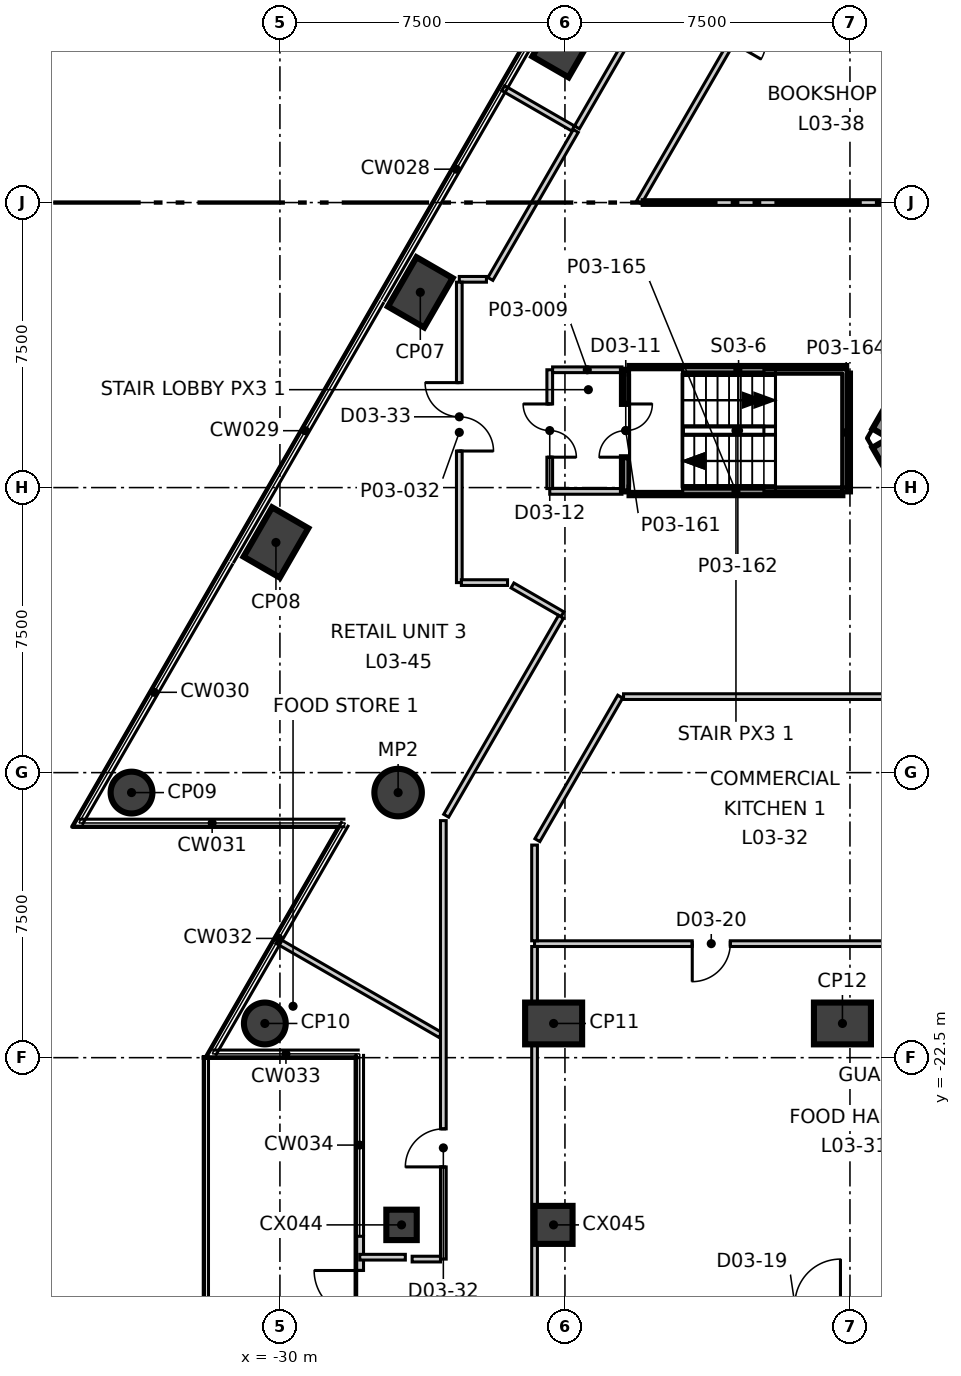
"""IFC4 building model, lengths in metres.
Left out: names, types, materials, properties, quantities, classifications, styles, units other than length and angle.
Written with IfcOpenShell. Run it as: python <this file> out.ifc"""

import sys

from ifc_helpers import new_model, si_unit, direction, frame, frame_2d, origin, origin_2d, place, context, subcontext, project, spatial, polyline, rectangle, circle, outline, extrude, element, fill, save


model = new_model("IFC4")
c1 = context("Model", 3, precision=1e-05, world=origin(), true_north=direction((0.0, 1.0)))
c2 = subcontext(c1, "Body", "Model", "MODEL_VIEW")
j1 = project(units=[si_unit("LENGTHUNIT", "METRE"), si_unit("PLANEANGLEUNIT", "RADIAN")], contexts=[c1])
p1 = place(None, origin())
s1 = spatial("IfcSite", under=j1, at=p1, CompositionType="ELEMENT")
p2 = place(p1, origin())
s2 = spatial("IfcBuilding", under=s1, at=p2, CompositionType="ELEMENT")
p3 = place(p2, frame((0.0, 0.0, 19.9)))
s3 = spatial("IfcBuildingStorey", under=s2, at=p3, CompositionType="ELEMENT", Elevation=19.9)
p4 = place(p3, frame((-1.617, 15.2, -0.4), z_axis=(0.0, 0.0, 1.0), x_axis=(-0.499992141631, -0.866029940768, 0.0)))
e1 = element("IfcWall", 1, at=p4, inside=s3, PredefinedType="SHEAR", context=c2, shape_type="SweptSolid", body=[
    extrude(outline(polyline([(-0.289, -0.499), (1.656, -0.499), (3.601, -0.499), (5.547, -0.499), (7.492, -0.499), (9.437, -0.5), (11.382, -0.5), (13.328, -0.5), (15.273, -0.5), (17.218, -0.5), (19.163, -0.5), (21.109, -0.5), (23.054, -0.5), (24.999, -0.5), (24.422, 0.5), (22.566, 0.5), (20.709, 0.5), (18.853, 0.5), (16.997, 0.5), (15.14, 0.5), (13.284, 0.5), (11.427, 0.5), (9.571, 0.5), (7.715, 0.5), (5.858, 0.5), (4.002, 0.5), (2.146, 0.5), (0.289, 0.5), (-0.289, -0.499)])), origin(), (0.0, 0.0, 1.0), 5.4),
])
p5 = place(p4, frame((11.805, 0.0, 0.4)))
e2 = element("IfcOpeningElement", 2, at=p5, cuts=e1, PredefinedType="OPENING", context=c2, shape_type="SweptSolid", body=[
    extrude(rectangle(XDim=1.1, YDim=2.1, at=frame_2d((0.55, 1.05))), frame((0.0, 0.51, 0.0), z_axis=(0.0, -1.0, 0.0), x_axis=(1.0, 0.0, 0.0)), (0.0, 0.0, 1.0), 1.02),
])
p6 = place(p3, frame((-13.972, -6.2, -0.4), z_axis=(0.0, 0.0, 1.0), x_axis=(0.500077567175, -0.865980615723, 0.0)))
e3 = element("IfcWall", 3, at=p6, inside=s3, PredefinedType="SHEAR", context=c2, shape_type="SweptSolid", body=[
    extrude(outline(polyline([(-0.289, -0.5), (1.616, -0.5), (3.522, -0.5), (2.944, 0.499), (1.617, 0.5), (0.289, 0.5), (-0.289, -0.5)])), origin(), (0.0, 0.0, 1.0), 5.4),
])
p7 = place(p6, frame((0.917, 0.0, 0.4)))
e4 = element("IfcOpeningElement", 4, at=p7, cuts=e3, PredefinedType="OPENING", context=c2, shape_type="SweptSolid", body=[
    extrude(rectangle(XDim=1.4, YDim=2.1, at=frame_2d((0.7, 1.05))), frame((0.0, 0.51, 0.0), z_axis=(0.0, -1.0, 0.0), x_axis=(1.0, 0.0, 0.0)), (0.0, 0.0, 1.0), 1.02),
])
for number, where, z_axis, x_axis in (
    (5, (-22.506, 4.219, -0.4), (0.0, 0.0, 1.0), (0.5, 0.866, 0.0)),
    (6, (-26.306, -2.362, -0.4), (0.0, 0.0, 1.0), (0.5, 0.866, 0.0)),
    (7, (-30.105, -8.944, -0.4), (0.0, 0.0, 1.0), (0.5, 0.866, 0.0)),
):
    element("IfcColumn", number, at=place(p3, frame(where, z_axis=z_axis, x_axis=x_axis)), inside=s3, PredefinedType="COLUMN", context=c2, shape_type="SweptSolid", body=[
        extrude(rectangle(XDim=1.5, YDim=1.1, at=origin_2d()), origin(), (0.0, 0.0, 1.0), 5.4),
    ])
for number, where, z_axis, x_axis in (
    (8, (-33.905, -15.525, -0.4), (0.0, 0.0, 1.0), (0.5, 0.866, 0.0)),
    (9, (-30.397, -21.6, -0.4), (0.0, 0.0, 1.0), (1.0, 0.0, 0.0)),
):
    element("IfcColumn", number, at=place(p3, frame(where, z_axis=z_axis, x_axis=x_axis)), inside=s3, PredefinedType="COLUMN", context=c2, shape_type="SweptSolid", body=[
        extrude(circle(Radius=0.55, at=origin_2d()), origin(), (0.0, 0.0, 1.0), 5.4),
    ])
for number, where, z_axis, x_axis in (
    (10, (-22.798, -21.6, -0.4), (0.0, 0.0, 1.0), (1.0, 0.0, 0.0)),
    (11, (-15.198, -21.6, -0.4), (0.0, 0.0, 1.0), (1.0, 0.0, 0.0)),
):
    element("IfcColumn", number, at=place(p3, frame(where, z_axis=z_axis, x_axis=x_axis)), inside=s3, PredefinedType="COLUMN", context=c2, shape_type="SweptSolid", body=[
        extrude(rectangle(XDim=1.5, YDim=1.1, at=origin_2d()), origin(), (0.0, 0.0, 1.0), 5.4),
    ])
p8 = place(p3, frame((-26.89, -15.525, -0.4), z_axis=(0.0, 0.0, 1.0), x_axis=(1.0, 0.0, 0.0)))
e12 = element("IfcColumn", 12, at=p8, inside=s3, PredefinedType="COLUMN", context=c2, shape_type="SweptSolid", body=[
    extrude(circle(Radius=0.625, at=origin_2d()), origin(), (0.0, 0.0, 1.0), 5.4),
])
p9 = place(p3, frame((-26.8, -26.9, -0.4), z_axis=(0.0, 0.0, 1.0), x_axis=(1.0, 0.0, 0.0)))
e13 = element("IfcColumn", 13, at=p9, inside=s3, PredefinedType="COLUMN", context=c2, shape_type="SweptSolid", body=[
    extrude(rectangle(XDim=0.8, YDim=0.8, at=origin_2d()), origin(), (0.0, 0.0, 1.0), 5.4),
])
p10 = place(p3, frame((-22.8, -26.9, -0.4), z_axis=(0.0, 0.0, 1.0), x_axis=(1.0, 0.0, 0.0)))
e14 = element("IfcColumn", 14, at=p10, inside=s3, PredefinedType="COLUMN", context=c2, shape_type="SweptSolid", body=[
    extrude(rectangle(XDim=1.0, YDim=1.0, at=origin_2d()), origin(), (0.0, 0.0, 1.0), 5.4),
])
p11 = place(p3, frame((-27.9, -27.2, 0.0), z_axis=(0.0, 0.0, 1.0), x_axis=(0.0, -1.0, 0.0)))
e15 = element("IfcWall", 15, at=p11, inside=s3, PredefinedType="ELEMENTEDWALL", context=c2, shape_type="SweptSolid", body=[
    extrude(rectangle(XDim=4.2, YDim=0.2, at=frame_2d((2.1, 0.0))), origin(), (0.0, 0.0, 1.0), 5.0),
])
p12 = place(p11, frame((0.9, 0.0, 0.0)))
e16 = element("IfcOpeningElement", 16, at=p12, cuts=e15, PredefinedType="OPENING", context=c2, shape_type="SweptSolid", body=[
    extrude(rectangle(XDim=2.4, YDim=2.4, at=frame_2d((1.2, 1.2))), frame((0.0, 0.11, 0.0), z_axis=(0.0, -1.0, 0.0), x_axis=(1.0, 0.0, 0.0)), (0.0, 0.0, 1.0), 0.22),
])
p13 = place(p3, frame((-23.3, -19.5, 0.0), z_axis=(0.0, 0.0, 1.0), x_axis=(1.0, 0.0, 0.0)))
e17 = element("IfcWall", 17, at=p13, inside=s3, PredefinedType="PARTITIONING", context=c2, shape_type="SweptSolid", body=[
    extrude(rectangle(XDim=9.3, YDim=0.15, at=frame_2d((4.65, 0.0))), origin(), (0.0, 0.0, 1.0), 5.0),
])
p14 = place(p13, frame((4.15, 0.0, 0.0)))
e18 = element("IfcOpeningElement", 18, at=p14, cuts=e17, PredefinedType="OPENING", context=c2, shape_type="SweptSolid", body=[
    extrude(rectangle(XDim=1.0, YDim=2.1, at=frame_2d((0.5, 1.05))), frame((0.0, 0.085, 0.0), z_axis=(0.0, -1.0, 0.0), x_axis=(1.0, 0.0, 0.0)), (0.0, 0.0, 1.0), 0.17),
])
p15 = place(p3, frame((-23.3, -19.425, 0.0), z_axis=(0.0, 0.0, 1.0), x_axis=(0.0, 1.0, 0.0)))
e19 = element("IfcWall", 19, at=p15, inside=s3, PredefinedType="PARTITIONING", context=c2, shape_type="SweptSolid", body=[
    extrude(rectangle(XDim=2.519, YDim=0.15, at=frame_2d((1.26, 0.0))), origin(), (0.0, 0.0, 1.0), 5.0),
])
p16 = place(p3, frame((-23.225, -16.777, 0.0), z_axis=(0.0, 0.0, 1.0), x_axis=(0.499908216116, 0.86607838875, 0.0)))
e20 = element("IfcWall", 20, at=p16, inside=s3, PredefinedType="PARTITIONING", context=c2, shape_type="SweptSolid", body=[
    extrude(rectangle(XDim=4.361, YDim=0.15, at=frame_2d((2.181, 0.0))), origin(), (0.0, 0.0, 1.0), 5.0),
])
p17 = place(p3, frame((-20.958, -13.0, 0.0), z_axis=(0.0, 0.0, 1.0), x_axis=(1.0, 0.0, 0.0)))
e21 = element("IfcWall", 21, at=p17, inside=s3, PredefinedType="PARTITIONING", context=c2, shape_type="SweptSolid", body=[
    extrude(rectangle(XDim=6.958, YDim=0.15, at=frame_2d((3.479, 0.0))), origin(), (0.0, 0.0, 1.0), 5.0),
])
p18 = place(p3, frame((-22.9, -7.6, 0.0), z_axis=(0.0, 0.0, 1.0), x_axis=(1.0, 0.0, 0.0)))
e22 = element("IfcWall", 22, at=p18, inside=s3, PredefinedType="PARTITIONING", context=c2, shape_type="SweptSolid", body=[
    extrude(rectangle(XDim=1.9, YDim=0.15, at=frame_2d((0.95, 0.0))), origin(), (0.0, 0.0, 1.0), 5.0),
])
p19 = place(p3, frame((-22.9, -7.525, 0.0), z_axis=(0.0, 0.0, 1.0), x_axis=(0.0, 1.0, 0.0)))
e23 = element("IfcWall", 23, at=p19, inside=s3, PredefinedType="PARTITIONING", context=c2, shape_type="SweptSolid", body=[
    extrude(rectangle(XDim=3.125, YDim=0.15, at=frame_2d((1.562, 0.0))), origin(), (0.0, 0.0, 1.0), 5.0),
])
p20 = place(p19, frame((0.825, 0.0, 0.0)))
e24 = element("IfcOpeningElement", 24, at=p20, cuts=e23, PredefinedType="OPENING", context=c2, shape_type="SweptSolid", body=[
    extrude(rectangle(XDim=1.4, YDim=2.1, at=frame_2d((0.7, 1.05))), frame((0.0, 0.085, 0.0), z_axis=(0.0, -1.0, 0.0), x_axis=(1.0, 0.0, 0.0)), (0.0, 0.0, 1.0), 0.17),
])
p21 = place(p3, frame((-22.825, -4.4, 0.0), z_axis=(0.0, 0.0, 1.0), x_axis=(1.0, 0.0, 0.0)))
e25 = element("IfcWall", 25, at=p21, inside=s3, PredefinedType="PARTITIONING", context=c2, shape_type="SweptSolid", body=[
    extrude(rectangle(XDim=1.825, YDim=0.15, at=frame_2d((0.913, 0.0))), origin(), (0.0, 0.0, 1.0), 5.0),
])
p22 = place(p3, frame((-30.066, -19.427, 0.0), z_axis=(0.0, 0.0, 1.0), x_axis=(0.866057584811, -0.499944256685, 0.0)))
e26 = element("IfcWall", 26, at=p22, inside=s3, PredefinedType="PARTITIONING", context=c2, shape_type="SweptSolid", body=[
    extrude(rectangle(XDim=4.955, YDim=0.15, at=frame_2d((2.477, 0.0))), origin(), (0.0, 0.0, 1.0), 5.0),
])
p23 = place(p3, frame((-25.7, -27.8, 0.0), z_axis=(0.0, 0.0, 1.0), x_axis=(0.0, 1.0, 0.0)))
e27 = element("IfcWall", 27, at=p23, inside=s3, PredefinedType="PARTITIONING", context=c2, shape_type="SweptSolid", body=[
    extrude(rectangle(XDim=11.537, YDim=0.15, at=frame_2d((5.769, 0.0))), origin(), (0.0, 0.0, 1.0), 5.0),
])
p24 = place(p23, frame((2.426, 0.0, 0.0)))
e28 = element("IfcOpeningElement", 28, at=p24, cuts=e27, PredefinedType="OPENING", context=c2, shape_type="SweptSolid", body=[
    extrude(rectangle(XDim=1.0, YDim=2.1, at=frame_2d((0.5, 1.05))), frame((0.0, 0.085, 0.0), z_axis=(0.0, -1.0, 0.0), x_axis=(1.0, 0.0, 0.0)), (0.0, 0.0, 1.0), 0.17),
])
p25 = place(p3, frame((-26.521, -27.8, 0.0), z_axis=(0.0, 0.0, 1.0), x_axis=(1.0, 0.0, 0.0)))
e29 = element("IfcWall", 29, at=p25, inside=s3, PredefinedType="PARTITIONING", context=c2, shape_type="SweptSolid", body=[
    extrude(rectangle(XDim=0.746, YDim=0.15, at=frame_2d((0.373, 0.0))), origin(), (0.0, 0.0, 1.0), 5.0),
])
p26 = place(p3, frame((-27.9, -27.75, 0.0), z_axis=(0.0, 0.0, 1.0), x_axis=(1.0, 0.0, 0.0)))
e30 = element("IfcWall", 30, at=p26, inside=s3, PredefinedType="PARTITIONING", context=c2, shape_type="SweptSolid", body=[
    extrude(rectangle(XDim=1.2, YDim=0.15, at=frame_2d((0.6, 0.0))), origin(), (0.0, 0.0, 1.0), 5.0),
])
p27 = place(p3, frame((-24.462, -2.01, 0.0), z_axis=(0.0, 0.0, 1.0), x_axis=(0.499835244236, 0.866120504675, 0.0)))
e31 = element("IfcWall", 31, at=p27, inside=s3, PredefinedType="PARTITIONING", context=c2, shape_type="SweptSolid", body=[
    extrude(rectangle(XDim=4.497, YDim=0.15, at=frame_2d((2.249, 0.0))), origin(), (0.0, 0.0, 1.0), 5.0),
])
p28 = place(p3, frame((-25.28, -2.02, 0.0), z_axis=(0.0, 0.0, 1.0), x_axis=(1.0, 0.0, 0.0)))
e32 = element("IfcWall", 32, at=p28, inside=s3, PredefinedType="PARTITIONING", context=c2, shape_type="SweptSolid", body=[
    extrude(rectangle(XDim=0.714, YDim=0.15, at=frame_2d((0.357, 0.0))), origin(), (0.0, 0.0, 1.0), 4.4),
])
p29 = place(p3, frame((-25.28, -10.0, 0.0), z_axis=(0.0, 0.0, 1.0), x_axis=(0.0, 1.0, 0.0)))
e33 = element("IfcWall", 33, at=p29, inside=s3, PredefinedType="PARTITIONING", context=c2, shape_type="SweptSolid", body=[
    extrude(rectangle(XDim=7.905, YDim=0.15, at=frame_2d((3.953, 0.0))), origin(), (0.0, 0.0, 1.0), 5.0),
])
p30 = place(p29, frame((3.462, 0.0, 0.0)))
e34 = element("IfcOpeningElement", 34, at=p30, cuts=e33, PredefinedType="OPENING", context=c2, shape_type="SweptSolid", body=[
    extrude(rectangle(XDim=1.8, YDim=2.1, at=frame_2d((0.9, 1.05))), frame((0.0, 0.085, 0.0), z_axis=(0.0, -1.0, 0.0), x_axis=(1.0, 0.0, 0.0)), (0.0, 0.0, 1.0), 0.17),
])
p31 = place(p3, frame((-25.225, -10.0, 0.0), z_axis=(0.0, 0.0, 1.0), x_axis=(1.0, 0.0, 0.0)))
e35 = element("IfcWall", 35, at=p31, inside=s3, PredefinedType="PARTITIONING", context=c2, shape_type="SweptSolid", body=[
    extrude(rectangle(XDim=1.214, YDim=0.15, at=frame_2d((0.607, 0.0))), origin(), (0.0, 0.0, 1.0), 5.0),
])
p32 = place(p3, frame((-23.881, -10.075, 0.0), z_axis=(0.0, 0.0, 1.0), x_axis=(0.866107952761, -0.499856993713, 0.0)))
e36 = element("IfcWall", 36, at=p32, inside=s3, PredefinedType="PARTITIONING", context=c2, shape_type="SweptSolid", body=[
    extrude(rectangle(XDim=1.519, YDim=0.15, at=frame_2d((0.759, 0.0))), origin(), (0.0, 0.0, 1.0), 5.0),
])
p33 = place(p3, frame((-25.625, -16.134, 0.0), z_axis=(0.0, 0.0, 1.0), x_axis=(0.499935724827, 0.866062509893, 0.0)))
e37 = element("IfcWall", 37, at=p33, inside=s3, PredefinedType="PARTITIONING", context=c2, shape_type="SweptSolid", body=[
    extrude(rectangle(XDim=6.045, YDim=0.15, at=frame_2d((3.022, 0.0))), origin(), (0.0, 0.0, 1.0), 5.0),
])
p34 = place(p3, frame((-24.126, 3.012, 0.0), z_axis=(0.0, 0.0, 1.0), x_axis=(0.86609948408, -0.499871667208, 0.0)))
e38 = element("IfcWall", 38, at=p34, inside=s3, PredefinedType="PARTITIONING", context=c2, shape_type="SweptSolid", body=[
    extrude(rectangle(XDim=2.125, YDim=0.15, at=frame_2d((1.062, 0.0))), origin(), (0.0, 0.0, 1.0), 5.0),
])
p35 = place(p3, frame((-23.3, -28.925, 0.0), z_axis=(0.0, 0.0, 1.0), x_axis=(0.0, 1.0, 0.0)))
e39 = element("IfcWall", 39, at=p35, inside=s3, PredefinedType="PARTITIONING", context=c2, shape_type="SweptSolid", body=[
    extrude(rectangle(XDim=9.35, YDim=0.15, at=frame_2d((4.675, 0.0))), origin(), (0.0, 0.0, 1.0), 5.0),
])
p36 = place(p3, frame((-22.184, 1.977, 0.0), z_axis=(0.0, 0.0, 1.0), x_axis=(0.500026811154, 0.866009923804, 0.0)))
e40 = element("IfcWall", 40, at=p36, inside=s3, PredefinedType="PARTITIONING", context=c2, shape_type="SweptSolid", body=[
    extrude(rectangle(XDim=12.035, YDim=0.15, at=frame_2d((6.018, 0.0))), origin(), (0.0, 0.0, 1.0), 5.0),
])
p37 = place(p36, frame((5.011, 0.0, 0.0)))
e41 = element("IfcOpeningElement", 41, at=p37, cuts=e40, PredefinedType="OPENING", context=c2, shape_type="SweptSolid", body=[
    extrude(rectangle(XDim=1.0, YDim=2.1, at=frame_2d((0.5, 1.05))), frame((0.0, 0.085, 0.0), z_axis=(0.0, -1.0, 0.0), x_axis=(1.0, 0.0, 0.0)), (0.0, 0.0, 1.0), 0.17),
])
p38 = place(p3, frame((-20.554, 0.0, 0.0), z_axis=(0.0, 0.0, 1.0), x_axis=(0.500027479704, 0.866009537788, 0.0)))
e42 = element("IfcWall", 42, at=p38, inside=s3, PredefinedType="PARTITIONING", context=c2, shape_type="SweptSolid", body=[
    extrude(rectangle(XDim=11.547, YDim=0.15, at=frame_2d((5.773, 0.0))), origin(), (0.0, 0.0, 1.0), 5.0),
])
p39 = place(p38, frame((4.874, 0.0, 0.0)))
e43 = element("IfcOpeningElement", 43, at=p39, cuts=e42, PredefinedType="OPENING", context=c2, shape_type="SweptSolid", body=[
    extrude(rectangle(XDim=1.8, YDim=2.1, at=frame_2d((0.9, 1.05))), frame((0.0, 0.085, 0.0), z_axis=(0.0, -1.0, 0.0), x_axis=(1.0, 0.0, 0.0)), (0.0, 0.0, 1.0), 0.17),
])
p40 = place(p3, frame((-20.467, 0.0, 0.0), z_axis=(0.0, 0.0, 1.0), x_axis=(1.0, 0.0, 0.0)))
e44 = element("IfcWall", 44, at=p40, inside=s3, PredefinedType="PARTITIONING", context=c2, shape_type="SweptSolid", body=[
    extrude(rectangle(XDim=6.38, YDim=0.15, at=frame_2d((3.19, 0.0))), origin(), (0.0, 0.0, 1.0), 5.0),
])
p41 = place(p3, frame((-20.9, -7.6, 0.0), z_axis=(0.0, 0.0, 1.0), x_axis=(0.0, 1.0, 0.0)))
e45 = element("IfcWall", 45, at=p41, inside=s3, PredefinedType="SOLIDWALL", context=c2, shape_type="SweptSolid", body=[
    extrude(rectangle(XDim=3.2, YDim=0.2, at=frame_2d((1.6, 0.0))), origin(), (0.0, 0.0, 1.0), 5.0),
])
p42 = place(p41, frame((0.9, 0.0, 0.0)))
e46 = element("IfcOpeningElement", 46, at=p42, cuts=e45, PredefinedType="OPENING", context=c2, shape_type="SweptSolid", body=[
    extrude(rectangle(XDim=1.4, YDim=2.1, at=frame_2d((0.7, 1.05))), frame((0.0, 0.11, 0.0), z_axis=(0.0, -1.0, 0.0), x_axis=(1.0, 0.0, 0.0)), (0.0, 0.0, 1.0), 0.22),
])
p43 = place(p3, frame((-20.8, -4.4, 0.0), z_axis=(0.0, 0.0, 1.0), x_axis=(1.0, 0.0, 0.0)))
e47 = element("IfcWall", 47, at=p43, inside=s3, PredefinedType="SOLIDWALL", context=c2, shape_type="SweptSolid", body=[
    extrude(rectangle(XDim=5.7, YDim=0.2, at=frame_2d((2.85, 0.0))), origin(), (0.0, 0.0, 1.0), 5.0),
])
p44 = place(p3, frame((-15.1, -7.6, 0.0), z_axis=(0.0, 0.0, 1.0), x_axis=(0.0, 1.0, 0.0)))
e48 = element("IfcWall", 48, at=p44, inside=s3, PredefinedType="SOLIDWALL", context=c2, shape_type="SweptSolid", body=[
    extrude(rectangle(XDim=3.1, YDim=0.2, at=frame_2d((1.55, 0.0))), origin(), (0.0, 0.0, 1.0), 5.0),
])
p45 = place(p3, frame((-20.8, -7.6, 0.0), z_axis=(0.0, 0.0, 1.0), x_axis=(1.0, 0.0, 0.0)))
e49 = element("IfcWall", 49, at=p45, inside=s3, PredefinedType="SOLIDWALL", context=c2, shape_type="SweptSolid", body=[
    extrude(rectangle(XDim=5.6, YDim=0.2, at=frame_2d((2.8, 0.0))), origin(), (0.0, 0.0, 1.0), 5.0),
])
p46 = place(p12, frame((2.4, 0.0, 0.0), z_axis=(0.0, 0.0, 1.0), x_axis=(-1.0, 0.0, 0.0)))
e50 = element("IfcDoor", 50, at=p46, inside=s3, OperationType="DOUBLE_DOOR_SINGLE_SWING", PredefinedType="DOOR", context=c2, shape_type="SweptSolid", body=[
    extrude(rectangle(XDim=2.4, YDim=2.4, at=frame_2d((1.2, 1.2))), frame((0.0, 0.025, 0.0), z_axis=(0.0, -1.0, 0.0), x_axis=(1.0, 0.0, 0.0)), (0.0, 0.0, 1.0), 0.05),
])
fill(e16, e50)
p47 = place(p42, origin())
e51 = element("IfcDoor", 51, at=p47, inside=s3, OperationType="DOUBLE_DOOR_SINGLE_SWING", PredefinedType="DOOR", context=c2, shape_type="SweptSolid", body=[
    extrude(rectangle(XDim=1.4, YDim=2.1, at=frame_2d((0.7, 1.05))), frame((0.0, 0.025, 0.0), z_axis=(0.0, -1.0, 0.0), x_axis=(1.0, 0.0, 0.0)), (0.0, 0.0, 1.0), 0.05),
])
fill(e46, e51)
p48 = place(p20, origin())
e52 = element("IfcDoor", 52, at=p48, inside=s3, OperationType="DOUBLE_DOOR_SINGLE_SWING", PredefinedType="DOOR", context=c2, shape_type="SweptSolid", body=[
    extrude(rectangle(XDim=1.4, YDim=2.1, at=frame_2d((0.7, 1.05))), frame((0.0, 0.025, 0.0), z_axis=(0.0, -1.0, 0.0), x_axis=(1.0, 0.0, 0.0)), (0.0, 0.0, 1.0), 0.05),
])
fill(e24, e52)
p49 = place(p14, origin())
e53 = element("IfcDoor", 53, at=p49, inside=s3, OperationType="SINGLE_SWING_LEFT", PredefinedType="DOOR", context=c2, shape_type="SweptSolid", body=[
    extrude(rectangle(XDim=1.0, YDim=2.1, at=frame_2d((0.5, 1.05))), frame((0.0, 0.025, 0.0), z_axis=(0.0, -1.0, 0.0), x_axis=(1.0, 0.0, 0.0)), (0.0, 0.0, 1.0), 0.05),
])
fill(e18, e53)
p50 = place(p24, origin())
e54 = element("IfcDoor", 54, at=p50, inside=s3, OperationType="SINGLE_SWING_RIGHT", PredefinedType="DOOR", context=c2, shape_type="SweptSolid", body=[
    extrude(rectangle(XDim=1.0, YDim=2.1, at=frame_2d((0.5, 1.05))), frame((0.0, 0.025, 0.0), z_axis=(0.0, -1.0, 0.0), x_axis=(1.0, 0.0, 0.0)), (0.0, 0.0, 1.0), 0.05),
])
fill(e28, e54)
p51 = place(p30, origin())
e55 = element("IfcDoor", 55, at=p51, inside=s3, OperationType="DOUBLE_DOOR_SINGLE_SWING", PredefinedType="DOOR", context=c2, shape_type="SweptSolid", body=[
    extrude(rectangle(XDim=1.8, YDim=2.1, at=frame_2d((0.9, 1.05))), frame((0.0, 0.025, 0.0), z_axis=(0.0, -1.0, 0.0), x_axis=(1.0, 0.0, 0.0)), (0.0, 0.0, 1.0), 0.05),
])
fill(e34, e55)
save(model, sys.argv[1])
